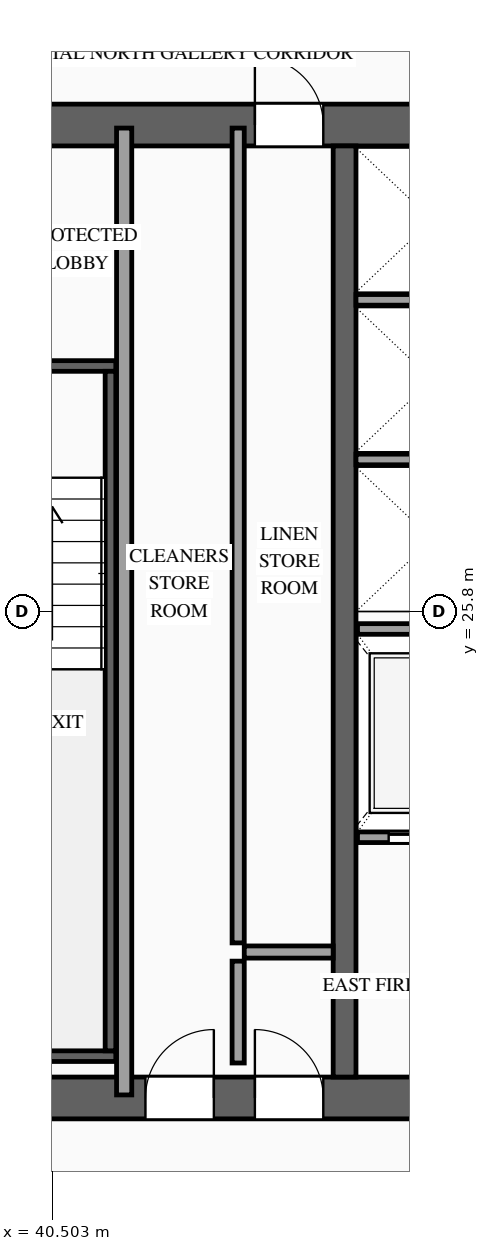
"""IFC4 building model, lengths in metres.
Left out: names, types, materials, properties, quantities, classifications, styles, units other than length and angle.
Written with IfcOpenShell. Run it as: python <this file> out.ifc"""

import sys

from ifc_helpers import new_model, si_unit, direction, frame, frame_2d, origin, place, context, subcontext, project, spatial, rectangle, extrude, source, transform, mapped, element, fill, save


model = new_model("IFC4")
c1 = context("Model", 3, precision=1e-05, world=origin(), true_north=direction((0.0, 1.0)))
c2 = subcontext(c1, "Body", "Model", "MODEL_VIEW")
j1 = project(units=[si_unit("LENGTHUNIT", "METRE"), si_unit("PLANEANGLEUNIT", "RADIAN")], contexts=[c1])
p1 = place(None, origin())
s1 = spatial("IfcSite", under=j1, at=p1, CompositionType="ELEMENT")
p2 = place(p1, origin())
s2 = spatial("IfcBuilding", under=s1, at=p2, CompositionType="ELEMENT")
p3 = place(p2, frame((0.0, 0.0, 224.1)))
s3 = spatial("IfcBuildingStorey", under=s2, at=p3, CompositionType="ELEMENT", Elevation=224.1)
p4 = place(p3, frame((23.525, 19.4, 0.0), z_axis=(0.0, 0.0, 1.0), x_axis=(1.0, 0.0, 0.0)))
e1 = element("IfcWall", 1, at=p4, inside=s3, PredefinedType="SHEAR", context=c2, shape_type="SweptSolid", body=[
    extrude(rectangle(XDim=26.95, YDim=0.55, at=frame_2d((13.475, 0.0))), origin(), (0.0, 0.0, 1.0), 3.5),
])
p5 = place(p4, frame((1.925, 0.0, 0.0)))
e2 = element("IfcOpeningElement", 2, at=p5, cuts=e1, PredefinedType="OPENING", context=c2, shape_type="SweptSolid", body=[
    extrude(rectangle(XDim=1.1, YDim=2.2, at=frame_2d((0.55, 1.1))), frame((0.0, 0.29, 0.0), z_axis=(0.0, -1.0, 0.0), x_axis=(1.0, 0.0, 0.0)), (0.0, 0.0, 1.0), 0.58),
])
p6 = place(p4, frame((9.825, 0.0, 0.0)))
e3 = element("IfcOpeningElement", 3, at=p6, cuts=e1, PredefinedType="OPENING", context=c2, shape_type="SweptSolid", body=[
    extrude(rectangle(XDim=1.1, YDim=2.2, at=frame_2d((0.55, 1.1))), frame((0.0, 0.29, 0.0), z_axis=(0.0, -1.0, 0.0), x_axis=(1.0, 0.0, 0.0)), (0.0, 0.0, 1.0), 0.58),
])
p7 = place(p4, frame((23.025, 0.0, 0.0)))
e4 = element("IfcOpeningElement", 4, at=p7, cuts=e1, PredefinedType="OPENING", context=c2, shape_type="SweptSolid", body=[
    extrude(rectangle(XDim=1.1, YDim=2.2, at=frame_2d((0.55, 1.1))), frame((0.0, 0.29, 0.0), z_axis=(0.0, -1.0, 0.0), x_axis=(1.0, 0.0, 0.0)), (0.0, 0.0, 1.0), 0.58),
])
p8 = place(p4, frame((19.645, 0.0, 0.0)))
e5 = element("IfcOpeningElement", 5, at=p8, cuts=e1, PredefinedType="OPENING", context=c2, shape_type="SweptSolid", body=[
    extrude(rectangle(XDim=0.9, YDim=2.15, at=frame_2d((0.45, 1.075))), frame((0.0, 0.29, 0.0), z_axis=(0.0, -1.0, 0.0), x_axis=(1.0, 0.0, 0.0)), (0.0, 0.0, 1.0), 0.58),
])
p9 = place(p4, frame((18.205, 0.0, 0.0)))
e6 = element("IfcOpeningElement", 6, at=p9, cuts=e1, PredefinedType="OPENING", context=c2, shape_type="SweptSolid", body=[
    extrude(rectangle(XDim=0.9, YDim=2.15, at=frame_2d((0.45, 1.075))), frame((0.0, 0.29, 0.0), z_axis=(0.0, -1.0, 0.0), x_axis=(1.0, 0.0, 0.0)), (0.0, 0.0, 1.0), 0.58),
])
p10 = place(p3, frame((23.525, 32.2, 0.0), z_axis=(0.0, 0.0, 1.0), x_axis=(1.0, 0.0, 0.0)))
e7 = element("IfcWall", 7, at=p10, inside=s3, PredefinedType="SHEAR", context=c2, shape_type="SweptSolid", body=[
    extrude(rectangle(XDim=26.95, YDim=0.55, at=frame_2d((13.475, 0.0))), origin(), (0.0, 0.0, 1.0), 3.5),
])
p11 = place(p10, frame((4.545, 0.0, 0.0)))
e8 = element("IfcOpeningElement", 8, at=p11, cuts=e7, PredefinedType="OPENING", context=c2, shape_type="SweptSolid", body=[
    extrude(rectangle(XDim=0.9, YDim=2.15, at=frame_2d((0.45, 1.075))), frame((0.0, 0.29, 0.0), z_axis=(0.0, -1.0, 0.0), x_axis=(1.0, 0.0, 0.0)), (0.0, 0.0, 1.0), 0.58),
])
p12 = place(p10, frame((9.825, 0.0, 0.0)))
e9 = element("IfcOpeningElement", 9, at=p12, cuts=e7, PredefinedType="OPENING", context=c2, shape_type="SweptSolid", body=[
    extrude(rectangle(XDim=1.1, YDim=2.2, at=frame_2d((0.55, 1.1))), frame((0.0, 0.29, 0.0), z_axis=(0.0, -1.0, 0.0), x_axis=(1.0, 0.0, 0.0)), (0.0, 0.0, 1.0), 0.58),
])
p13 = place(p10, frame((15.675, 0.0, 0.0)))
e10 = element("IfcOpeningElement", 10, at=p13, cuts=e7, PredefinedType="OPENING", context=c2, shape_type="SweptSolid", body=[
    extrude(rectangle(XDim=1.1, YDim=2.2, at=frame_2d((0.55, 1.1))), frame((0.0, 0.29, 0.0), z_axis=(0.0, -1.0, 0.0), x_axis=(1.0, 0.0, 0.0)), (0.0, 0.0, 1.0), 0.58),
])
p14 = place(p10, frame((19.645, 0.0, 0.0)))
e11 = element("IfcOpeningElement", 11, at=p14, cuts=e7, PredefinedType="OPENING", context=c2, shape_type="SweptSolid", body=[
    extrude(rectangle(XDim=0.9, YDim=2.15, at=frame_2d((0.45, 1.075))), frame((0.0, 0.29, 0.0), z_axis=(0.0, -1.0, 0.0), x_axis=(1.0, 0.0, 0.0)), (0.0, 0.0, 1.0), 0.58),
])
m1 = source(origin(), c2, "Body", "SweptSolid", [
    extrude(rectangle(XDim=12.25, YDim=0.3, at=frame_2d((6.125, 0.0))), origin(), (0.0, 0.0, 1.0), 3.5),
])
p15 = place(p3, frame((44.35, 19.675, 0.0), z_axis=(0.0, 0.0, 1.0), x_axis=(0.0, 1.0, 0.0)))
e12 = element("IfcWall", 12, at=p15, inside=s3, PredefinedType="SOLIDWALL", context=c2, shape_type="MappedRepresentation", body=[
    mapped(m1, transform((0.0, 0.0, 0.0), scale=1.0)),
])
p16 = place(p3, frame((44.52, 22.83, 0.0), z_axis=(0.0, 0.0, 1.0), x_axis=(1.0, 0.0, 0.0)))
e13 = element("IfcWall", 13, at=p16, inside=s3, PredefinedType="SOLIDWALL", context=c2, shape_type="SweptSolid", body=[
    extrude(rectangle(XDim=1.92, YDim=0.14, at=frame_2d((0.96, 0.0))), origin(), (0.0, 0.0, 1.0), 3.28),
])
p17 = place(p16, frame((0.41, 0.0, 0.0)))
e14 = element("IfcOpeningElement", 14, at=p17, cuts=e13, PredefinedType="OPENING", context=c2, shape_type="SweptSolid", body=[
    extrude(rectangle(XDim=1.1, YDim=2.2, at=frame_2d((0.55, 1.1))), frame((0.0, 0.085, 0.0), z_axis=(0.0, -1.0, 0.0), x_axis=(1.0, 0.0, 0.0)), (0.0, 0.0, 1.0), 0.17),
])
m2 = source(origin(), c2, "Body", "SweptSolid", [
    extrude(rectangle(XDim=1.92, YDim=0.14, at=frame_2d((0.96, 0.0))), origin(), (0.0, 0.0, 1.0), 3.28),
])
p18 = place(p3, frame((44.52, 25.57, 0.0), z_axis=(0.0, 0.0, 1.0), x_axis=(1.0, 0.0, 0.0)))
e15 = element("IfcWall", 15, at=p18, inside=s3, PredefinedType="SOLIDWALL", context=c2, shape_type="MappedRepresentation", body=[
    mapped(m2, transform((0.0, 0.0, 0.0), scale=1.0)),
])
m3 = source(origin(), c2, "Body", "SweptSolid", [
    extrude(rectangle(XDim=2.0, YDim=0.14, at=frame_2d((1.0, 0.0))), origin(), (0.0, 0.0, 1.0), 3.28),
])
for number, where, z_axis, x_axis in (
    (16, (44.5, 27.8, 0.0), (0.0, 0.0, 1.0), (1.0, 0.0, 0.0)),
    (17, (44.5, 29.9, 0.0), (0.0, 0.0, 1.0), (1.0, 0.0, 0.0)),
):
    element("IfcWall", number, at=place(p3, frame(where, z_axis=z_axis, x_axis=x_axis)), inside=s3, PredefinedType="SOLIDWALL", context=c2, shape_type="MappedRepresentation", body=[
        mapped(m3, transform((0.0, 0.0, 0.0), scale=1.0)),
    ])
p19 = place(p3, frame((38.2, 29.03, 0.0), z_axis=(0.0, 0.0, 1.0), x_axis=(1.0, 0.0, 0.0)))
e18 = element("IfcWall", 18, at=p19, inside=s3, PredefinedType="SOLIDWALL", context=c2, shape_type="SweptSolid", body=[
    extrude(rectangle(XDim=3.14, YDim=0.14, at=frame_2d((1.57, 0.0))), origin(), (0.0, 0.0, 1.0), 3.28),
])
p20 = place(p19, frame((1.02, 0.0, 0.0)))
e19 = element("IfcOpeningElement", 19, at=p20, cuts=e18, PredefinedType="OPENING", context=c2, shape_type="SweptSolid", body=[
    extrude(rectangle(XDim=1.1, YDim=2.2, at=frame_2d((0.55, 1.1))), frame((0.0, 0.085, 0.0), z_axis=(0.0, -1.0, 0.0), x_axis=(1.0, 0.0, 0.0)), (0.0, 0.0, 1.0), 0.17),
])
m4 = source(origin(), c2, "Body", "SweptSolid", [
    extrude(rectangle(XDim=3.14, YDim=0.14, at=frame_2d((1.57, 0.0))), origin(), (0.0, 0.0, 1.0), 3.28),
])
p21 = place(p3, frame((38.2, 19.95, 0.0), z_axis=(0.0, 0.0, 1.0), x_axis=(1.0, 0.0, 0.0)))
e20 = element("IfcWall", 20, at=p21, inside=s3, PredefinedType="SOLIDWALL", context=c2, shape_type="MappedRepresentation", body=[
    mapped(m4, transform((0.0, 0.0, 0.0), scale=1.0)),
])
m5 = source(origin(), c2, "Body", "SweptSolid", [
    extrude(rectangle(XDim=8.94, YDim=0.14, at=frame_2d((4.47, 0.0))), origin(), (0.0, 0.0, 1.0), 3.28),
])
p22 = place(p3, frame((41.27, 20.02, 0.0), z_axis=(0.0, 0.0, 1.0), x_axis=(0.0, 1.0, 0.0)))
e21 = element("IfcWall", 21, at=p22, inside=s3, PredefinedType="SOLIDWALL", context=c2, shape_type="MappedRepresentation", body=[
    mapped(m5, transform((0.0, 0.0, 0.0), scale=1.0)),
])
m6 = source(origin(), c2, "Body", "SweptSolid", [
    extrude(rectangle(XDim=1.34, YDim=0.16, at=frame_2d((0.67, 0.0))), origin(), (0.0, 0.0, 1.0), 3.28),
])
p23 = place(p3, frame((42.95, 19.86, 0.0), z_axis=(0.0, 0.0, 1.0), x_axis=(0.0, 1.0, 0.0)))
e22 = element("IfcWall", 22, at=p23, inside=s3, PredefinedType="PARTITIONING", context=c2, shape_type="MappedRepresentation", body=[
    mapped(m6, transform((0.0, 0.0, 0.0), scale=1.0)),
])
m7 = source(origin(), c2, "Body", "SweptSolid", [
    extrude(rectangle(XDim=1.17, YDim=0.16, at=frame_2d((0.585, 0.0))), origin(), (0.0, 0.0, 1.0), 3.28),
])
p24 = place(p3, frame((43.03, 21.32, 0.0), z_axis=(0.0, 0.0, 1.0), x_axis=(1.0, 0.0, 0.0)))
e23 = element("IfcWall", 23, at=p24, inside=s3, PredefinedType="PARTITIONING", context=c2, shape_type="MappedRepresentation", body=[
    mapped(m7, transform((0.0, 0.0, 0.0), scale=1.0)),
])
m8 = source(origin(), c2, "Body", "SweptSolid", [
    extrude(rectangle(XDim=12.72, YDim=0.2, at=frame_2d((6.36, 0.0))), origin(), (0.0, 0.0, 1.0), 3.28),
])
p25 = place(p3, frame((41.45, 19.44, 0.0), z_axis=(0.0, 0.0, 1.0), x_axis=(0.0, 1.0, 0.0)))
e24 = element("IfcWall", 24, at=p25, inside=s3, PredefinedType="PARTITIONING", context=c2, shape_type="MappedRepresentation", body=[
    mapped(m8, transform((0.0, 0.0, 0.0), scale=1.0)),
])
m9 = source(origin(), c2, "Body", "SweptSolid", [
    extrude(rectangle(XDim=10.72, YDim=0.16, at=frame_2d((5.36, 0.0))), origin(), (0.0, 0.0, 1.0), 3.28),
])
p26 = place(p3, frame((42.95, 21.44, 0.0), z_axis=(0.0, 0.0, 1.0), x_axis=(0.0, 1.0, 0.0)))
e25 = element("IfcWall", 25, at=p26, inside=s3, PredefinedType="PARTITIONING", context=c2, shape_type="MappedRepresentation", body=[
    mapped(m9, transform((0.0, 0.0, 0.0), scale=1.0)),
])
m10 = source(origin(), c2, "Body", "SweptSolid", [
    extrude(rectangle(XDim=1.1, YDim=2.2, at=frame_2d((0.55, 1.1))), frame((0.0, 0.025, 0.0), z_axis=(0.0, -1.0, 0.0), x_axis=(1.0, 0.0, 0.0)), (0.0, 0.0, 1.0), 0.05),
])
p27 = place(p17, origin())
e26 = element("IfcDoor", 26, at=p27, inside=s3, OperationType="SLIDING_TO_RIGHT", PredefinedType="DOOR", context=c2, shape_type="MappedRepresentation", body=[
    mapped(m10, transform((0.0, 0.0, 0.0), scale=1.0)),
])
fill(e14, e26)
m11 = source(origin(), c2, "Body", "SweptSolid", [
    extrude(rectangle(XDim=0.9, YDim=2.15, at=frame_2d((0.45, 1.075))), frame((0.0, 0.025, 0.0), z_axis=(0.0, -1.0, 0.0), x_axis=(1.0, 0.0, 0.0)), (0.0, 0.0, 1.0), 0.05),
])
p28 = place(p8, origin())
e27 = element("IfcDoor", 27, at=p28, inside=s3, OperationType="SINGLE_SWING_LEFT", PredefinedType="DOOR", context=c2, shape_type="MappedRepresentation", body=[
    mapped(m11, transform((0.0, 0.0, 0.0), scale=1.0)),
])
fill(e5, e27)
p29 = place(p9, origin())
e28 = element("IfcDoor", 28, at=p29, inside=s3, OperationType="SINGLE_SWING_RIGHT", PredefinedType="DOOR", context=c2, shape_type="MappedRepresentation", body=[
    mapped(m11, transform((0.0, 0.0, 0.0), scale=1.0)),
])
fill(e6, e28)
p30 = place(p14, origin())
e29 = element("IfcDoor", 29, at=p30, inside=s3, OperationType="SINGLE_SWING_LEFT", PredefinedType="DOOR", context=c2, shape_type="MappedRepresentation", body=[
    mapped(m11, transform((0.0, 0.0, 0.0), scale=1.0)),
])
fill(e11, e29)
save(model, sys.argv[1])
